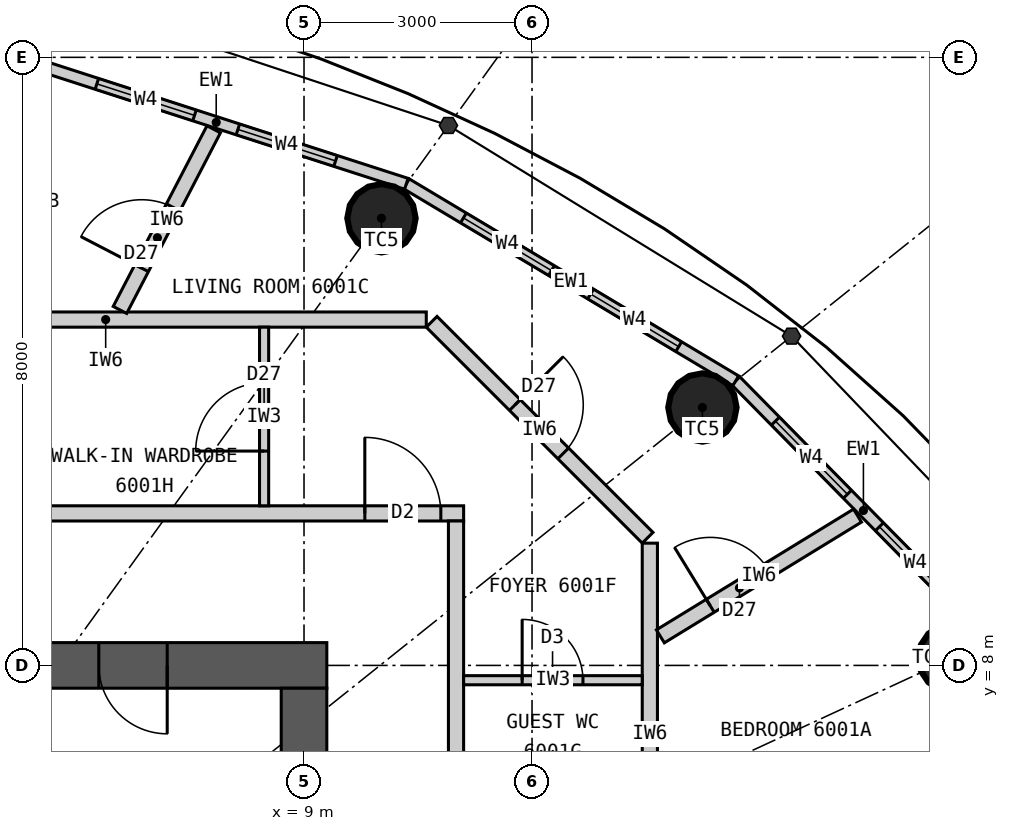
"""IFC4 building model, lengths in metres.
Left out: names, types, materials, properties, quantities, classifications, styles, units other than length and angle.
Written with IfcOpenShell. Run it as: python <this file> out.ifc"""

import sys

from ifc_helpers import new_model, si_unit, direction, frame, frame_2d, origin, origin_2d, place, context, subcontext, project, spatial, rectangle, circle, extrude, element, fill, save


model = new_model("IFC4")
c1 = context("Model", 3, precision=1e-05, world=origin(), true_north=direction((0.0, 1.0)))
c2 = subcontext(c1, "Body", "Model", "MODEL_VIEW")
j1 = project(units=[si_unit("LENGTHUNIT", "METRE"), si_unit("PLANEANGLEUNIT", "RADIAN")], contexts=[c1])
p1 = place(None, origin())
s1 = spatial("IfcSite", under=j1, at=p1, CompositionType="ELEMENT")
p2 = place(p1, origin())
s2 = spatial("IfcBuilding", under=s1, at=p2, CompositionType="ELEMENT")
p3 = place(p2, frame((0.0, 0.0, 222.6)))
s3 = spatial("IfcBuildingStorey", under=s2, at=p3, CompositionType="ELEMENT", Elevation=222.6)
for number, where, z_axis, x_axis in (
    (1, (17.532, 8.098, 0.0), (0.0, 0.0, 1.0), (1.0, 0.0, 0.0)),
    (2, (14.241, 11.393, 0.0), (0.0, 0.0, 1.0), (1.0, 0.0, 0.0)),
    (3, (10.019, 13.883, 0.0), (0.0, 0.0, 1.0), (1.0, 0.0, 0.0)),
):
    element("IfcColumn", number, at=place(p3, frame(where, z_axis=z_axis, x_axis=x_axis)), inside=s3, PredefinedType="COLUMN", context=c2, shape_type="SweptSolid", body=[
        extrude(circle(Radius=0.45, at=origin_2d()), origin(), (0.0, 0.0, 1.0), 3.3),
    ])
p4 = place(p3, frame((-9.3, 8.0, 0.0), z_axis=(0.0, 0.0, 1.0), x_axis=(1.0, 0.0, 0.0)))
e4 = element("IfcWall", 4, at=p4, inside=s3, PredefinedType="SHEAR", context=c2, shape_type="SweptSolid", body=[
    extrude(rectangle(XDim=18.6, YDim=0.6, at=frame_2d((9.3, 0.0))), origin(), (0.0, 0.0, 1.0), 3.3),
])
p5 = place(p4, frame((8.0, 0.0, 0.0)))
e5 = element("IfcOpeningElement", 5, at=p5, cuts=e4, PredefinedType="OPENING", context=c2, shape_type="SweptSolid", body=[
    extrude(rectangle(XDim=1.2, YDim=2.2, at=frame_2d((0.6, 1.1))), frame((0.0, 0.31, 0.0), z_axis=(0.0, -1.0, 0.0), x_axis=(1.0, 0.0, 0.0)), (0.0, 0.0, 1.0), 0.62),
])
p6 = place(p4, frame((15.6, 0.0, 0.0)))
e6 = element("IfcOpeningElement", 6, at=p6, cuts=e4, PredefinedType="OPENING", context=c2, shape_type="SweptSolid", body=[
    extrude(rectangle(XDim=0.9, YDim=2.2, at=frame_2d((0.45, 1.1))), frame((0.0, 0.31, 0.0), z_axis=(0.0, -1.0, 0.0), x_axis=(1.0, 0.0, 0.0)), (0.0, 0.0, 1.0), 0.62),
])
p7 = place(p3, frame((9.0, -7.7, 0.0), z_axis=(0.0, 0.0, 1.0), x_axis=(0.0, 1.0, 0.0)))
e7 = element("IfcWall", 7, at=p7, inside=s3, PredefinedType="SHEAR", context=c2, shape_type="SweptSolid", body=[
    extrude(rectangle(XDim=15.4, YDim=0.6, at=frame_2d((7.7, 0.0))), origin(), (0.0, 0.0, 1.0), 3.3),
])
p8 = place(p7, frame((6.8, 0.0, 0.0)))
e8 = element("IfcOpeningElement", 8, at=p8, cuts=e7, PredefinedType="OPENING", context=c2, shape_type="SweptSolid", body=[
    extrude(rectangle(XDim=1.8, YDim=2.2, at=frame_2d((0.9, 1.1))), frame((0.0, 0.31, 0.0), z_axis=(0.0, -1.0, 0.0), x_axis=(1.0, 0.0, 0.0)), (0.0, 0.0, 1.0), 0.62),
])
p9 = place(p3, frame((18.04, 8.332, 0.0), z_axis=(0.0, 0.0, 1.0), x_axis=(-0.701527379618, 0.712642501993, 0.0)))
e9 = element("IfcWall", 9, at=p9, inside=s3, PredefinedType="ELEMENTEDWALL", context=c2, shape_type="SweptSolid", body=[
    extrude(rectangle(XDim=4.788, YDim=0.15, at=frame_2d((2.394, 0.0))), origin(), (0.0, 0.0, 1.0), 3.12),
])
p10 = place(p9, frame((0.744, 0.0, 0.9)))
e10 = element("IfcOpeningElement", 10, at=p10, cuts=e9, PredefinedType="OPENING", context=c2, shape_type="SweptSolid", body=[
    extrude(rectangle(XDim=1.35, YDim=1.9, at=frame_2d((0.675, 0.95))), frame((0.0, 0.085, 0.0), z_axis=(0.0, -1.0, 0.0), x_axis=(1.0, 0.0, 0.0)), (0.0, 0.0, 1.0), 0.17),
])
p11 = place(p9, frame((2.694, 0.0, 0.9)))
e11 = element("IfcOpeningElement", 11, at=p11, cuts=e9, PredefinedType="OPENING", context=c2, shape_type="SweptSolid", body=[
    extrude(rectangle(XDim=1.35, YDim=1.9, at=frame_2d((0.675, 0.95))), frame((0.0, 0.085, 0.0), z_axis=(0.0, -1.0, 0.0), x_axis=(1.0, 0.0, 0.0)), (0.0, 0.0, 1.0), 0.17),
])
p12 = place(p3, frame((14.68, 11.744, 0.0), z_axis=(0.0, 0.0, 1.0), x_axis=(-0.85822150553, 0.513279502265, 0.0)))
e12 = element("IfcWall", 12, at=p12, inside=s3, PredefinedType="ELEMENTEDWALL", context=c2, shape_type="SweptSolid", body=[
    extrude(rectangle(XDim=5.05, YDim=0.15, at=frame_2d((2.525, 0.0))), origin(), (0.0, 0.0, 1.0), 3.12),
])
p13 = place(p12, frame((0.875, 0.0, 0.9)))
e13 = element("IfcOpeningElement", 13, at=p13, cuts=e12, PredefinedType="OPENING", context=c2, shape_type="SweptSolid", body=[
    extrude(rectangle(XDim=1.35, YDim=1.9, at=frame_2d((0.675, 0.95))), frame((0.0, 0.085, 0.0), z_axis=(0.0, -1.0, 0.0), x_axis=(1.0, 0.0, 0.0)), (0.0, 0.0, 1.0), 0.17),
])
p14 = place(p12, frame((2.825, 0.0, 0.9)))
e14 = element("IfcOpeningElement", 14, at=p14, cuts=e12, PredefinedType="OPENING", context=c2, shape_type="SweptSolid", body=[
    extrude(rectangle(XDim=1.35, YDim=1.9, at=frame_2d((0.675, 0.95))), frame((0.0, 0.085, 0.0), z_axis=(0.0, -1.0, 0.0), x_axis=(1.0, 0.0, 0.0)), (0.0, 0.0, 1.0), 0.17),
])
p15 = place(p3, frame((10.346, 14.336, 0.0), z_axis=(0.0, 0.0, 1.0), x_axis=(-0.951644702515, 0.307200846638, 0.0)))
e15 = element("IfcWall", 15, at=p15, inside=s3, PredefinedType="ELEMENTEDWALL", context=c2, shape_type="SweptSolid", body=[
    extrude(rectangle(XDim=5.258, YDim=0.15, at=frame_2d((2.629, 0.0))), origin(), (0.0, 0.0, 1.0), 3.12),
])
p16 = place(p15, frame((0.979, 0.0, 0.9)))
e16 = element("IfcOpeningElement", 16, at=p16, cuts=e15, PredefinedType="OPENING", context=c2, shape_type="SweptSolid", body=[
    extrude(rectangle(XDim=1.35, YDim=1.9, at=frame_2d((0.675, 0.95))), frame((0.0, 0.085, 0.0), z_axis=(0.0, -1.0, 0.0), x_axis=(1.0, 0.0, 0.0)), (0.0, 0.0, 1.0), 0.17),
])
p17 = place(p15, frame((2.929, 0.0, 0.9)))
e17 = element("IfcOpeningElement", 17, at=p17, cuts=e15, PredefinedType="OPENING", context=c2, shape_type="SweptSolid", body=[
    extrude(rectangle(XDim=1.35, YDim=1.9, at=frame_2d((0.675, 0.95))), frame((0.0, 0.085, 0.0), z_axis=(0.0, -1.0, 0.0), x_axis=(1.0, 0.0, 0.0)), (0.0, 0.0, 1.0), 0.17),
])
p18 = place(p3, frame((-11.1, 10.0, 0.0), z_axis=(0.0, 0.0, 1.0), x_axis=(1.0, 0.0, 0.0)))
e18 = element("IfcWall", 18, at=p18, inside=s3, PredefinedType="PARTITIONING", context=c2, shape_type="SweptSolid", body=[
    extrude(rectangle(XDim=22.2, YDim=0.2, at=frame_2d((11.1, 0.0))), origin(), (0.0, 0.0, 1.0), 3.12),
])
p19 = place(p18, frame((20.9, 0.0, 0.0)))
e19 = element("IfcOpeningElement", 19, at=p19, cuts=e18, PredefinedType="OPENING", context=c2, shape_type="SweptSolid", body=[
    extrude(rectangle(XDim=1.0, YDim=2.2, at=frame_2d((0.5, 1.1))), frame((0.0, 0.11, 0.0), z_axis=(0.0, -1.0, 0.0), x_axis=(1.0, 0.0, 0.0)), (0.0, 0.0, 1.0), 0.22),
])
p20 = place(p18, frame((2.82, 0.0, 0.0)))
e20 = element("IfcOpeningElement", 20, at=p20, cuts=e18, PredefinedType="OPENING", context=c2, shape_type="SweptSolid", body=[
    extrude(rectangle(XDim=1.0, YDim=2.2, at=frame_2d((0.5, 1.1))), frame((0.0, 0.11, 0.0), z_axis=(0.0, -1.0, 0.0), x_axis=(1.0, 0.0, 0.0)), (0.0, 0.0, 1.0), 0.22),
])
p21 = place(p3, frame((11.0, -0.464, 0.0), z_axis=(0.0, 0.0, 1.0), x_axis=(0.0, 1.0, 0.0)))
e21 = element("IfcWall", 21, at=p21, inside=s3, PredefinedType="PARTITIONING", context=c2, shape_type="SweptSolid", body=[
    extrude(rectangle(XDim=10.364, YDim=0.2, at=frame_2d((5.182, 0.0))), origin(), (0.0, 0.0, 1.0), 3.12),
])
p22 = place(p3, frame((13.55, 4.6, 0.0), z_axis=(0.0, 0.0, 1.0), x_axis=(0.0, 1.0, 0.0)))
e22 = element("IfcWall", 22, at=p22, inside=s3, PredefinedType="PARTITIONING", context=c2, shape_type="SweptSolid", body=[
    extrude(rectangle(XDim=5.009, YDim=0.2, at=frame_2d((2.504, 0.0))), origin(), (0.0, 0.0, 1.0), 3.12),
])
p23 = place(p22, frame((0.724, 0.0, 0.0)))
e23 = element("IfcOpeningElement", 23, at=p23, cuts=e22, PredefinedType="OPENING", context=c2, shape_type="SweptSolid", body=[
    extrude(rectangle(XDim=0.8, YDim=2.1, at=frame_2d((0.4, 1.05))), frame((0.0, 0.11, 0.0), z_axis=(0.0, -1.0, 0.0), x_axis=(1.0, 0.0, 0.0)), (0.0, 0.0, 1.0), 0.22),
])
p24 = place(p3, frame((13.521, 9.679, 0.0), z_axis=(0.0, 0.0, 1.0), x_axis=(-0.707106781187, 0.707106781187, 0.0)))
e24 = element("IfcWall", 24, at=p24, inside=s3, PredefinedType="PARTITIONING", context=c2, shape_type="SweptSolid", body=[
    extrude(rectangle(XDim=4.019, YDim=0.2, at=frame_2d((2.009, 0.0))), origin(), (0.0, 0.0, 1.0), 3.12),
])
p25 = place(p24, frame((1.57, 0.0, 0.0)))
e25 = element("IfcOpeningElement", 25, at=p25, cuts=e24, PredefinedType="OPENING", context=c2, shape_type="SweptSolid", body=[
    extrude(rectangle(XDim=0.9, YDim=2.1, at=frame_2d((0.45, 1.05))), frame((0.0, 0.11, 0.0), z_axis=(0.0, -1.0, 0.0), x_axis=(1.0, 0.0, 0.0)), (0.0, 0.0, 1.0), 0.22),
])
p26 = place(p3, frame((10.609, 12.55, 0.0), z_axis=(0.0, 0.0, 1.0), x_axis=(-1.0, 0.0, 0.0)))
e26 = element("IfcWall", 26, at=p26, inside=s3, PredefinedType="PARTITIONING", context=c2, shape_type="SweptSolid", body=[
    extrude(rectangle(XDim=8.437, YDim=0.2, at=frame_2d((4.218, 0.0))), origin(), (0.0, 0.0, 1.0), 3.12),
])
p27 = place(p26, frame((5.376, 0.0, 0.0)))
e27 = element("IfcOpeningElement", 27, at=p27, cuts=e26, PredefinedType="OPENING", context=c2, shape_type="SweptSolid", body=[
    extrude(rectangle(XDim=0.8, YDim=2.1, at=frame_2d((0.4, 1.05))), frame((0.0, 0.11, 0.0), z_axis=(0.0, -1.0, 0.0), x_axis=(1.0, 0.0, 0.0)), (0.0, 0.0, 1.0), 0.22),
])
p28 = place(p3, frame((13.688, 8.382, 0.0), z_axis=(0.0, 0.0, 1.0), x_axis=(0.852783459586, 0.522264656144, 0.0)))
e28 = element("IfcWall", 28, at=p28, inside=s3, PredefinedType="PARTITIONING", context=c2, shape_type="SweptSolid", body=[
    extrude(rectangle(XDim=3.042, YDim=0.2, at=frame_2d((1.521, 0.0))), origin(), (0.0, 0.0, 1.0), 3.12),
])
p29 = place(p28, frame((0.77, 0.0, 0.0)))
e29 = element("IfcOpeningElement", 29, at=p29, cuts=e28, PredefinedType="OPENING", context=c2, shape_type="SweptSolid", body=[
    extrude(rectangle(XDim=0.9, YDim=2.1, at=frame_2d((0.45, 1.05))), frame((0.0, 0.11, 0.0), z_axis=(0.0, -1.0, 0.0), x_axis=(1.0, 0.0, 0.0)), (0.0, 0.0, 1.0), 0.22),
])
p30 = place(p3, frame((6.578, 12.677, 0.0), z_axis=(0.0, 0.0, 1.0), x_axis=(0.460620531465, 0.887597164255, 0.0)))
e30 = element("IfcWall", 30, at=p30, inside=s3, PredefinedType="PARTITIONING", context=c2, shape_type="SweptSolid", body=[
    extrude(rectangle(XDim=2.678, YDim=0.2, at=frame_2d((1.339, 0.0))), origin(), (0.0, 0.0, 1.0), 3.12),
])
p31 = place(p30, frame((0.62, 0.0, 0.0)))
e31 = element("IfcOpeningElement", 31, at=p31, cuts=e30, PredefinedType="OPENING", context=c2, shape_type="SweptSolid", body=[
    extrude(rectangle(XDim=0.9, YDim=2.1, at=frame_2d((0.45, 1.05))), frame((0.0, 0.11, 0.0), z_axis=(0.0, -1.0, 0.0), x_axis=(1.0, 0.0, 0.0)), (0.0, 0.0, 1.0), 0.22),
])
p32 = place(p3, frame((11.1, 7.805, 0.0), z_axis=(0.0, 0.0, 1.0), x_axis=(1.0, 0.0, 0.0)))
e32 = element("IfcWall", 32, at=p32, inside=s3, PredefinedType="PARTITIONING", context=c2, shape_type="SweptSolid", body=[
    extrude(rectangle(XDim=2.35, YDim=0.12, at=frame_2d((1.175, 0.0))), origin(), (0.0, 0.0, 1.0), 3.12),
])
p33 = place(p32, frame((0.77, 0.0, 0.0)))
e33 = element("IfcOpeningElement", 33, at=p33, cuts=e32, PredefinedType="OPENING", context=c2, shape_type="SweptSolid", body=[
    extrude(rectangle(XDim=0.8, YDim=2.1, at=frame_2d((0.4, 1.05))), frame((0.0, 0.07, 0.0), z_axis=(0.0, -1.0, 0.0), x_axis=(1.0, 0.0, 0.0)), (0.0, 0.0, 1.0), 0.14),
])
p34 = place(p3, frame((8.475, 10.1, 0.0), z_axis=(0.0, 0.0, 1.0), x_axis=(0.0, 1.0, 0.0)))
e34 = element("IfcWall", 34, at=p34, inside=s3, PredefinedType="PARTITIONING", context=c2, shape_type="SweptSolid", body=[
    extrude(rectangle(XDim=2.35, YDim=0.12, at=frame_2d((1.175, 0.0))), origin(), (0.0, 0.0, 1.0), 3.12),
])
p35 = place(p34, frame((0.72, 0.0, 0.0)))
e35 = element("IfcOpeningElement", 35, at=p35, cuts=e34, PredefinedType="OPENING", context=c2, shape_type="SweptSolid", body=[
    extrude(rectangle(XDim=0.9, YDim=2.1, at=frame_2d((0.45, 1.05))), frame((0.0, 0.07, 0.0), z_axis=(0.0, -1.0, 0.0), x_axis=(1.0, 0.0, 0.0)), (0.0, 0.0, 1.0), 0.14),
])
p36 = place(p10, origin())
e36 = element("IfcWindow", 36, at=p36, inside=s3, PartitioningType="SINGLE_PANEL", PredefinedType="WINDOW", context=c2, shape_type="SweptSolid", body=[
    extrude(rectangle(XDim=1.35, YDim=1.9, at=frame_2d((0.675, 0.95))), frame((0.0, 0.03, 0.0), z_axis=(0.0, -1.0, 0.0), x_axis=(1.0, 0.0, 0.0)), (0.0, 0.0, 1.0), 0.06),
])
fill(e10, e36)
p37 = place(p11, origin())
e37 = element("IfcWindow", 37, at=p37, inside=s3, PartitioningType="SINGLE_PANEL", PredefinedType="WINDOW", context=c2, shape_type="SweptSolid", body=[
    extrude(rectangle(XDim=1.35, YDim=1.9, at=frame_2d((0.675, 0.95))), frame((0.0, 0.03, 0.0), z_axis=(0.0, -1.0, 0.0), x_axis=(1.0, 0.0, 0.0)), (0.0, 0.0, 1.0), 0.06),
])
fill(e11, e37)
p38 = place(p13, origin())
e38 = element("IfcWindow", 38, at=p38, inside=s3, PartitioningType="SINGLE_PANEL", PredefinedType="WINDOW", context=c2, shape_type="SweptSolid", body=[
    extrude(rectangle(XDim=1.35, YDim=1.9, at=frame_2d((0.675, 0.95))), frame((0.0, 0.03, 0.0), z_axis=(0.0, -1.0, 0.0), x_axis=(1.0, 0.0, 0.0)), (0.0, 0.0, 1.0), 0.06),
])
fill(e13, e38)
p39 = place(p14, origin())
e39 = element("IfcWindow", 39, at=p39, inside=s3, PartitioningType="SINGLE_PANEL", PredefinedType="WINDOW", context=c2, shape_type="SweptSolid", body=[
    extrude(rectangle(XDim=1.35, YDim=1.9, at=frame_2d((0.675, 0.95))), frame((0.0, 0.03, 0.0), z_axis=(0.0, -1.0, 0.0), x_axis=(1.0, 0.0, 0.0)), (0.0, 0.0, 1.0), 0.06),
])
fill(e14, e39)
p40 = place(p16, origin())
e40 = element("IfcWindow", 40, at=p40, inside=s3, PartitioningType="SINGLE_PANEL", PredefinedType="WINDOW", context=c2, shape_type="SweptSolid", body=[
    extrude(rectangle(XDim=1.35, YDim=1.9, at=frame_2d((0.675, 0.95))), frame((0.0, 0.03, 0.0), z_axis=(0.0, -1.0, 0.0), x_axis=(1.0, 0.0, 0.0)), (0.0, 0.0, 1.0), 0.06),
])
fill(e16, e40)
p41 = place(p17, origin())
e41 = element("IfcWindow", 41, at=p41, inside=s3, PartitioningType="SINGLE_PANEL", PredefinedType="WINDOW", context=c2, shape_type="SweptSolid", body=[
    extrude(rectangle(XDim=1.35, YDim=1.9, at=frame_2d((0.675, 0.95))), frame((0.0, 0.03, 0.0), z_axis=(0.0, -1.0, 0.0), x_axis=(1.0, 0.0, 0.0)), (0.0, 0.0, 1.0), 0.06),
])
fill(e17, e41)
p42 = place(p19, origin())
e42 = element("IfcDoor", 42, at=p42, inside=s3, OperationType="SINGLE_SWING_LEFT", PredefinedType="DOOR", context=c2, shape_type="SweptSolid", body=[
    extrude(rectangle(XDim=1.0, YDim=2.2, at=frame_2d((0.5, 1.1))), frame((0.0, 0.025, 0.0), z_axis=(0.0, -1.0, 0.0), x_axis=(1.0, 0.0, 0.0)), (0.0, 0.0, 1.0), 0.05),
])
fill(e19, e42)
p43 = place(p33, origin())
e43 = element("IfcDoor", 43, at=p43, inside=s3, OperationType="SINGLE_SWING_LEFT", PredefinedType="DOOR", context=c2, shape_type="SweptSolid", body=[
    extrude(rectangle(XDim=0.8, YDim=2.1, at=frame_2d((0.4, 1.05))), frame((0.0, 0.025, 0.0), z_axis=(0.0, -1.0, 0.0), x_axis=(1.0, 0.0, 0.0)), (0.0, 0.0, 1.0), 0.05),
])
fill(e33, e43)
p44 = place(p35, origin())
e44 = element("IfcDoor", 44, at=p44, inside=s3, OperationType="SINGLE_SWING_LEFT", PredefinedType="DOOR", context=c2, shape_type="SweptSolid", body=[
    extrude(rectangle(XDim=0.9, YDim=2.1, at=frame_2d((0.45, 1.05))), frame((0.0, 0.025, 0.0), z_axis=(0.0, -1.0, 0.0), x_axis=(1.0, 0.0, 0.0)), (0.0, 0.0, 1.0), 0.05),
])
fill(e35, e44)
p45 = place(p25, origin())
e45 = element("IfcDoor", 45, at=p45, inside=s3, OperationType="SINGLE_SWING_RIGHT", PredefinedType="DOOR", context=c2, shape_type="SweptSolid", body=[
    extrude(rectangle(XDim=0.9, YDim=2.1, at=frame_2d((0.45, 1.05))), frame((0.0, 0.025, 0.0), z_axis=(0.0, -1.0, 0.0), x_axis=(1.0, 0.0, 0.0)), (0.0, 0.0, 1.0), 0.05),
])
fill(e25, e45)
p46 = place(p29, origin())
e46 = element("IfcDoor", 46, at=p46, inside=s3, OperationType="SINGLE_SWING_LEFT", PredefinedType="DOOR", context=c2, shape_type="SweptSolid", body=[
    extrude(rectangle(XDim=0.9, YDim=2.1, at=frame_2d((0.45, 1.05))), frame((0.0, 0.025, 0.0), z_axis=(0.0, -1.0, 0.0), x_axis=(1.0, 0.0, 0.0)), (0.0, 0.0, 1.0), 0.05),
])
fill(e29, e46)
p47 = place(p31, origin())
e47 = element("IfcDoor", 47, at=p47, inside=s3, OperationType="SINGLE_SWING_LEFT", PredefinedType="DOOR", context=c2, shape_type="SweptSolid", body=[
    extrude(rectangle(XDim=0.9, YDim=2.1, at=frame_2d((0.45, 1.05))), frame((0.0, 0.025, 0.0), z_axis=(0.0, -1.0, 0.0), x_axis=(1.0, 0.0, 0.0)), (0.0, 0.0, 1.0), 0.05),
])
fill(e31, e47)
p48 = place(p6, origin())
e48 = element("IfcDoor", 48, at=p48, inside=s3, OperationType="SINGLE_SWING_RIGHT", PredefinedType="DOOR", context=c2, shape_type="SweptSolid", body=[
    extrude(rectangle(XDim=0.9, YDim=2.2, at=frame_2d((0.45, 1.1))), frame((0.0, 0.025, 0.0), z_axis=(0.0, -1.0, 0.0), x_axis=(1.0, 0.0, 0.0)), (0.0, 0.0, 1.0), 0.05),
])
fill(e6, e48)
save(model, sys.argv[1])
